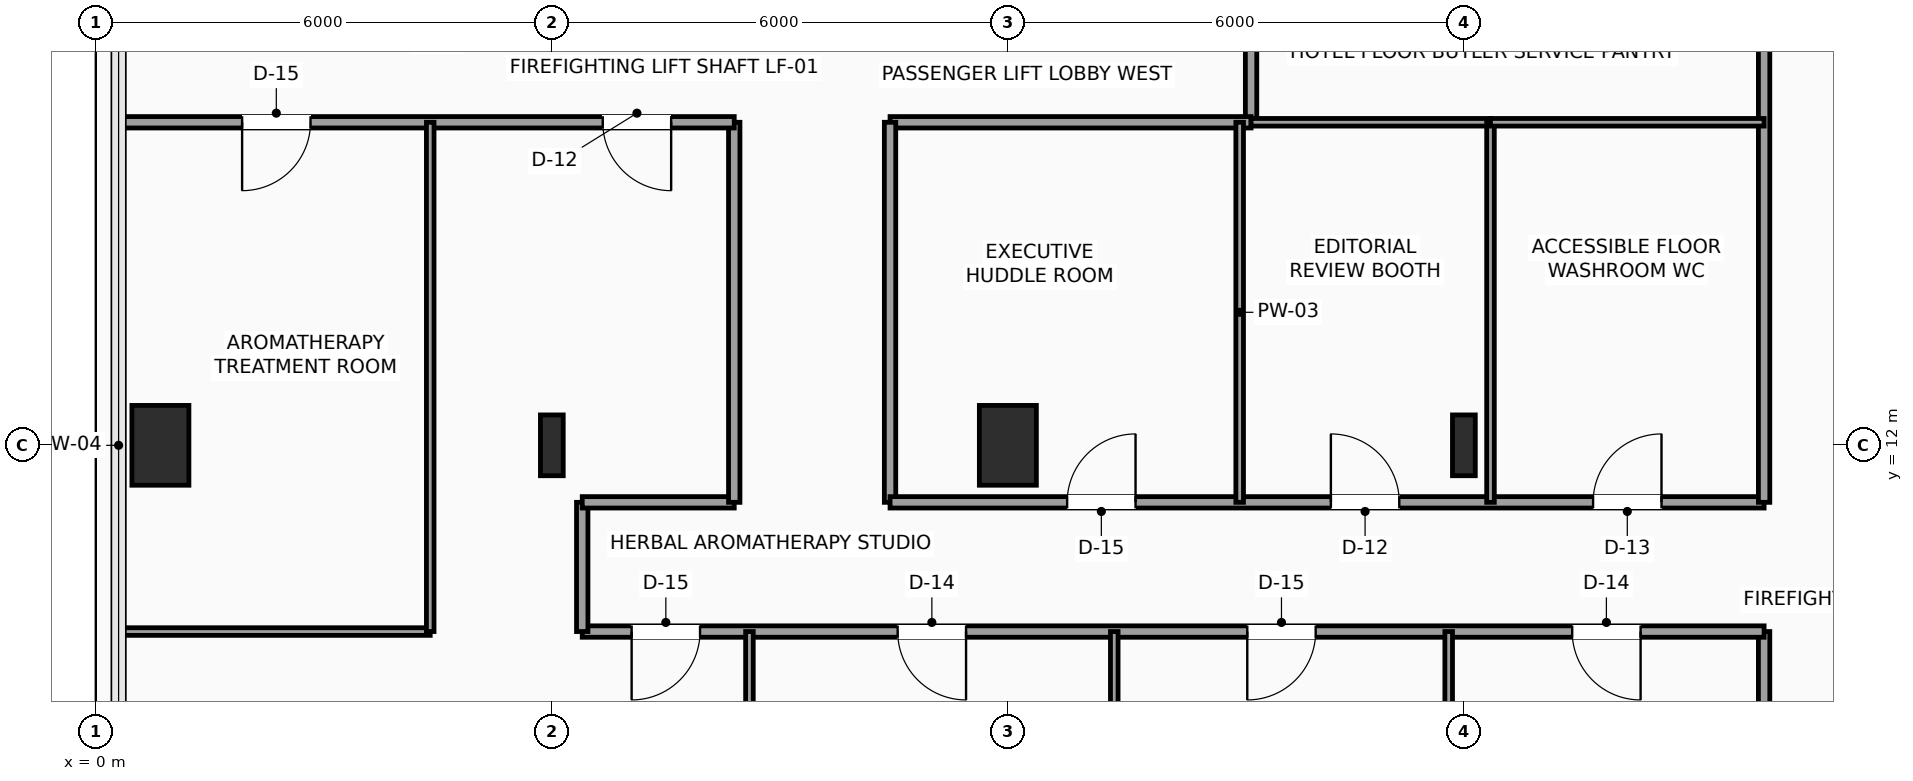
"""IFC4 building model, lengths in metres.
Left out: names, types, materials, properties, quantities, classifications, styles, units other than length and angle.
Written with IfcOpenShell. Run it as: python <this file> out.ifc"""

import sys

from ifc_helpers import new_model, si_unit, direction, frame, frame_2d, origin, origin_2d, place, context, subcontext, project, spatial, rectangle, i_section, extrude, element, fill, save


model = new_model("IFC4")
c1 = context("Model", 3, precision=1e-05, world=origin(), true_north=direction((0.0, 1.0)))
c2 = subcontext(c1, "Body", "Model", "MODEL_VIEW")
j1 = project(units=[si_unit("LENGTHUNIT", "METRE"), si_unit("PLANEANGLEUNIT", "RADIAN")], contexts=[c1])
p1 = place(None, origin())
s1 = spatial("IfcSite", under=j1, at=p1, CompositionType="ELEMENT")
p2 = place(p1, origin())
s2 = spatial("IfcBuilding", under=s1, at=p2, CompositionType="ELEMENT")
p3 = place(p2, frame((0.0, 0.0, 195.45)))
s3 = spatial("IfcBuildingStorey", under=s2, at=p3, CompositionType="ELEMENT", Elevation=195.45)
p4 = place(p3, frame((0.85, 12.0, 0.0), z_axis=(0.0, 0.0, 1.0), x_axis=(1.0, 0.0, 0.0)))
e1 = element("IfcColumn", 1, at=p4, inside=s3, PredefinedType="COLUMN", context=c2, shape_type="SweptSolid", body=[
    extrude(rectangle(XDim=0.75, YDim=1.05, at=origin_2d()), origin(), (0.0, 0.0, 1.0), 3.75),
])
p5 = place(p3, frame((6.0, 12.0, 0.0), z_axis=(0.0, 0.0, 1.0), x_axis=(1.0, 0.0, 0.0)))
e2 = element("IfcColumn", 2, at=p5, inside=s3, PredefinedType="COLUMN", context=c2, shape_type="SweptSolid", body=[
    extrude(i_section(OverallWidth=0.3, OverallDepth=0.8, WebThickness=0.018, FlangeThickness=0.033, FilletRadius=0.03, at=origin_2d()), origin(), (0.0, 0.0, 1.0), 3.75),
])
p6 = place(p3, frame((12.0, 12.0, 0.0), z_axis=(0.0, 0.0, 1.0), x_axis=(1.0, 0.0, 0.0)))
e3 = element("IfcColumn", 3, at=p6, inside=s3, PredefinedType="COLUMN", context=c2, shape_type="SweptSolid", body=[
    extrude(rectangle(XDim=0.75, YDim=1.05, at=origin_2d()), origin(), (0.0, 0.0, 1.0), 3.75),
])
p7 = place(p3, frame((18.0, 12.0, 0.0), z_axis=(0.0, 0.0, 1.0), x_axis=(1.0, 0.0, 0.0)))
e4 = element("IfcColumn", 4, at=p7, inside=s3, PredefinedType="COLUMN", context=c2, shape_type="SweptSolid", body=[
    extrude(i_section(OverallWidth=0.3, OverallDepth=0.8, WebThickness=0.018, FlangeThickness=0.033, FilletRadius=0.03, at=origin_2d()), origin(), (0.0, 0.0, 1.0), 3.75),
])
p8 = place(p3, frame((21.95, 5.8, 0.0), z_axis=(0.0, 0.0, 1.0), x_axis=(0.0, 1.0, 0.0)))
e5 = element("IfcWall", 5, at=p8, inside=s3, PredefinedType="PARTITIONING", context=c2, shape_type="SweptSolid", body=[
    extrude(rectangle(XDim=3.75, YDim=0.15, at=frame_2d((1.875, 0.0))), origin(), (0.0, 0.0, 1.0), 3.475),
])
p9 = place(p3, frame((21.95, 9.55, 0.0), z_axis=(0.0, 0.0, 1.0), x_axis=(-1.0, 0.0, 0.0)))
e6 = element("IfcWall", 6, at=p9, inside=s3, PredefinedType="PARTITIONING", context=c2, shape_type="SweptSolid", body=[
    extrude(rectangle(XDim=15.55, YDim=0.15, at=frame_2d((7.775, 0.0))), origin(), (0.0, 0.0, 1.0), 3.475),
])
p10 = place(p9, frame((14.0, 0.0, 0.0)))
e7 = element("IfcOpeningElement", 7, at=p10, cuts=e6, PredefinedType="OPENING", context=c2, shape_type="SweptSolid", body=[
    extrude(rectangle(XDim=0.9, YDim=2.1, at=frame_2d((0.45, 1.05))), frame((0.0, 0.085, 0.0), z_axis=(0.0, -1.0, 0.0), x_axis=(1.0, 0.0, 0.0)), (0.0, 0.0, 1.0), 0.17),
])
p11 = place(p9, frame((10.5, 0.0, 0.0)))
e8 = element("IfcOpeningElement", 8, at=p11, cuts=e6, PredefinedType="OPENING", context=c2, shape_type="SweptSolid", body=[
    extrude(rectangle(XDim=0.9, YDim=2.1, at=frame_2d((0.45, 1.05))), frame((0.0, 0.085, 0.0), z_axis=(0.0, -1.0, 0.0), x_axis=(1.0, 0.0, 0.0)), (0.0, 0.0, 1.0), 0.17),
])
p12 = place(p9, frame((5.9, 0.0, 0.0)))
e9 = element("IfcOpeningElement", 9, at=p12, cuts=e6, PredefinedType="OPENING", context=c2, shape_type="SweptSolid", body=[
    extrude(rectangle(XDim=0.9, YDim=2.1, at=frame_2d((0.45, 1.05))), frame((0.0, 0.085, 0.0), z_axis=(0.0, -1.0, 0.0), x_axis=(1.0, 0.0, 0.0)), (0.0, 0.0, 1.0), 0.17),
])
p13 = place(p9, frame((1.625, 0.0, 0.0)))
e10 = element("IfcOpeningElement", 10, at=p13, cuts=e6, PredefinedType="OPENING", context=c2, shape_type="SweptSolid", body=[
    extrude(rectangle(XDim=0.9, YDim=2.1, at=frame_2d((0.45, 1.05))), frame((0.0, 0.085, 0.0), z_axis=(0.0, -1.0, 0.0), x_axis=(1.0, 0.0, 0.0)), (0.0, 0.0, 1.0), 0.17),
])
p14 = place(p3, frame((6.4, 9.55, 0.0), z_axis=(0.0, 0.0, 1.0), x_axis=(0.0, 1.0, 0.0)))
e11 = element("IfcWall", 11, at=p14, inside=s3, PredefinedType="PARTITIONING", context=c2, shape_type="SweptSolid", body=[
    extrude(rectangle(XDim=1.7, YDim=0.15, at=frame_2d((0.85, 0.0))), origin(), (0.0, 0.0, 1.0), 3.475),
])
p15 = place(p3, frame((6.4, 11.25, 0.0), z_axis=(0.0, 0.0, 1.0), x_axis=(1.0, 0.0, 0.0)))
e12 = element("IfcWall", 12, at=p15, inside=s3, PredefinedType="PARTITIONING", context=c2, shape_type="SweptSolid", body=[
    extrude(rectangle(XDim=2.0, YDim=0.15, at=frame_2d((1.0, 0.0))), origin(), (0.0, 0.0, 1.0), 3.475),
])
p16 = place(p3, frame((8.4, 11.25, 0.0), z_axis=(0.0, 0.0, 1.0), x_axis=(0.0, 1.0, 0.0)))
e13 = element("IfcWall", 13, at=p16, inside=s3, PredefinedType="PARTITIONING", context=c2, shape_type="SweptSolid", body=[
    extrude(rectangle(XDim=5.0, YDim=0.15, at=frame_2d((2.5, 0.0))), origin(), (0.0, 0.0, 1.0), 3.475),
])
p17 = place(p3, frame((8.4, 16.25, 0.0), z_axis=(0.0, 0.0, 1.0), x_axis=(-1.0, 0.0, 0.0)))
e14 = element("IfcWall", 14, at=p17, inside=s3, PredefinedType="PARTITIONING", context=c2, shape_type="SweptSolid", body=[
    extrude(rectangle(XDim=8.1, YDim=0.15, at=frame_2d((4.05, 0.0))), origin(), (0.0, 0.0, 1.0), 3.475),
])
p18 = place(p17, frame((5.575, 0.0, 0.0)))
e15 = element("IfcOpeningElement", 15, at=p18, cuts=e14, PredefinedType="OPENING", context=c2, shape_type="SweptSolid", body=[
    extrude(rectangle(XDim=0.9, YDim=2.1, at=frame_2d((0.45, 1.05))), frame((0.0, 0.085, 0.0), z_axis=(0.0, -1.0, 0.0), x_axis=(1.0, 0.0, 0.0)), (0.0, 0.0, 1.0), 0.17),
])
p19 = place(p17, frame((0.83, 0.0, 0.0)))
e16 = element("IfcOpeningElement", 16, at=p19, cuts=e14, PredefinedType="OPENING", context=c2, shape_type="SweptSolid", body=[
    extrude(rectangle(XDim=0.9, YDim=2.1, at=frame_2d((0.45, 1.05))), frame((0.0, 0.085, 0.0), z_axis=(0.0, -1.0, 0.0), x_axis=(1.0, 0.0, 0.0)), (0.0, 0.0, 1.0), 0.17),
])
p20 = place(p3, frame((15.2, 17.95, 0.0), z_axis=(0.0, 0.0, 1.0), x_axis=(0.0, -1.0, 0.0)))
e17 = element("IfcWall", 17, at=p20, inside=s3, PredefinedType="PARTITIONING", context=c2, shape_type="SweptSolid", body=[
    extrude(rectangle(XDim=1.7, YDim=0.15, at=frame_2d((0.85, 0.0))), origin(), (0.0, 0.0, 1.0), 3.475),
])
p21 = place(p3, frame((15.2, 16.25, 0.0), z_axis=(0.0, 0.0, 1.0), x_axis=(-1.0, 0.0, 0.0)))
e18 = element("IfcWall", 18, at=p21, inside=s3, PredefinedType="PARTITIONING", context=c2, shape_type="SweptSolid", body=[
    extrude(rectangle(XDim=4.75, YDim=0.15, at=frame_2d((2.375, 0.0))), origin(), (0.0, 0.0, 1.0), 3.475),
])
p22 = place(p3, frame((10.45, 16.25, 0.0), z_axis=(0.0, 0.0, 1.0), x_axis=(0.0, -1.0, 0.0)))
e19 = element("IfcWall", 19, at=p22, inside=s3, PredefinedType="PARTITIONING", context=c2, shape_type="SweptSolid", body=[
    extrude(rectangle(XDim=5.0, YDim=0.15, at=frame_2d((2.5, 0.0))), origin(), (0.0, 0.0, 1.0), 3.475),
])
p23 = place(p3, frame((10.45, 11.25, 0.0), z_axis=(0.0, 0.0, 1.0), x_axis=(1.0, 0.0, 0.0)))
e20 = element("IfcWall", 20, at=p23, inside=s3, PredefinedType="PARTITIONING", context=c2, shape_type="SweptSolid", body=[
    extrude(rectangle(XDim=11.5, YDim=0.15, at=frame_2d((5.75, 0.0))), origin(), (0.0, 0.0, 1.0), 3.475),
])
p24 = place(p23, frame((2.33, 0.0, 0.0)))
e21 = element("IfcOpeningElement", 21, at=p24, cuts=e20, PredefinedType="OPENING", context=c2, shape_type="SweptSolid", body=[
    extrude(rectangle(XDim=0.9, YDim=2.1, at=frame_2d((0.45, 1.05))), frame((0.0, 0.085, 0.0), z_axis=(0.0, -1.0, 0.0), x_axis=(1.0, 0.0, 0.0)), (0.0, 0.0, 1.0), 0.17),
])
p25 = place(p23, frame((5.8, 0.0, 0.0)))
e22 = element("IfcOpeningElement", 22, at=p25, cuts=e20, PredefinedType="OPENING", context=c2, shape_type="SweptSolid", body=[
    extrude(rectangle(XDim=0.9, YDim=2.1, at=frame_2d((0.45, 1.05))), frame((0.0, 0.085, 0.0), z_axis=(0.0, -1.0, 0.0), x_axis=(1.0, 0.0, 0.0)), (0.0, 0.0, 1.0), 0.17),
])
p26 = place(p23, frame((9.25, 0.0, 0.0)))
e23 = element("IfcOpeningElement", 23, at=p26, cuts=e20, PredefinedType="OPENING", context=c2, shape_type="SweptSolid", body=[
    extrude(rectangle(XDim=0.9, YDim=2.1, at=frame_2d((0.45, 1.05))), frame((0.0, 0.085, 0.0), z_axis=(0.0, -1.0, 0.0), x_axis=(1.0, 0.0, 0.0)), (0.0, 0.0, 1.0), 0.17),
])
p27 = place(p3, frame((21.95, 11.25, 0.0), z_axis=(0.0, 0.0, 1.0), x_axis=(0.0, 1.0, 0.0)))
e24 = element("IfcWall", 24, at=p27, inside=s3, PredefinedType="PARTITIONING", context=c2, shape_type="SweptSolid", body=[
    extrude(rectangle(XDim=19.0, YDim=0.15, at=frame_2d((9.5, 0.0))), origin(), (0.0, 0.0, 1.0), 3.475),
])
p28 = place(p3, frame((15.05, 11.25, 0.0), z_axis=(0.0, 0.0, 1.0), x_axis=(0.0, 1.0, 0.0)))
e25 = element("IfcWall", 25, at=p28, inside=s3, PredefinedType="PARTITIONING", context=c2, shape_type="SweptSolid", body=[
    extrude(rectangle(XDim=5.0, YDim=0.1, at=frame_2d((2.5, 0.0))), origin(), (0.0, 0.0, 1.0), 3.475),
])
p29 = place(p3, frame((15.2, 16.25, 0.0), z_axis=(0.0, 0.0, 1.0), x_axis=(1.0, 0.0, 0.0)))
e26 = element("IfcWall", 26, at=p29, inside=s3, PredefinedType="PARTITIONING", context=c2, shape_type="SweptSolid", body=[
    extrude(rectangle(XDim=3.15, YDim=0.1, at=frame_2d((1.575, 0.0))), origin(), (0.0, 0.0, 1.0), 3.475),
])
p30 = place(p3, frame((18.35, 11.25, 0.0), z_axis=(0.0, 0.0, 1.0), x_axis=(0.0, 1.0, 0.0)))
e27 = element("IfcWall", 27, at=p30, inside=s3, PredefinedType="PARTITIONING", context=c2, shape_type="SweptSolid", body=[
    extrude(rectangle(XDim=5.0, YDim=0.1, at=frame_2d((2.5, 0.0))), origin(), (0.0, 0.0, 1.0), 3.475),
])
p31 = place(p3, frame((18.35, 16.25, 0.0), z_axis=(0.0, 0.0, 1.0), x_axis=(1.0, 0.0, 0.0)))
e28 = element("IfcWall", 28, at=p31, inside=s3, PredefinedType="PARTITIONING", context=c2, shape_type="SweptSolid", body=[
    extrude(rectangle(XDim=3.6, YDim=0.1, at=frame_2d((1.8, 0.0))), origin(), (0.0, 0.0, 1.0), 3.475),
])
p32 = place(p3, frame((0.35, 0.35, 0.0), z_axis=(0.0, 0.0, 1.0), x_axis=(-0.005440038388, 0.999985202882, 0.0)))
e29 = element("IfcWall", 29, at=p32, inside=s3, PredefinedType="PARTITIONING", context=c2, shape_type="SweptSolid", body=[
    extrude(rectangle(XDim=9.2, YDim=0.1, at=frame_2d((4.6, 0.0))), origin(), (0.0, 0.0, 1.0), 3.475),
])
for number, where, z_axis, x_axis in (
    (30, (8.6, 0.3, 0.0), (0.0, 0.0, 1.0), (0.0, 1.0, 0.0)),
    (31, (13.4, 0.3, 0.0), (0.0, 0.0, 1.0), (0.0, 1.0, 0.0)),
):
    element("IfcWall", number, at=place(p3, frame(where, z_axis=z_axis, x_axis=x_axis)), inside=s3, PredefinedType="PARTITIONING", context=c2, shape_type="SweptSolid", body=[
        extrude(rectangle(XDim=9.25, YDim=0.1, at=frame_2d((4.625, 0.0))), origin(), (0.0, 0.0, 1.0), 3.475),
    ])
p33 = place(p3, frame((17.8, 0.3, 0.0), z_axis=(0.0, 0.0, 1.0), x_axis=(0.0, 1.0, 0.0)))
e32 = element("IfcWall", 32, at=p33, inside=s3, PredefinedType="PARTITIONING", context=c2, shape_type="SweptSolid", body=[
    extrude(rectangle(XDim=9.25, YDim=0.1, at=frame_2d((4.625, 0.0))), origin(), (0.0, 0.0, 1.0), 3.067),
])
p34 = place(p3, frame((0.3, 9.55, 0.0), z_axis=(0.0, 0.0, 1.0), x_axis=(1.0, 0.0, 0.0)))
e33 = element("IfcWall", 33, at=p34, inside=s3, PredefinedType="PARTITIONING", context=c2, shape_type="SweptSolid", body=[
    extrude(rectangle(XDim=4.1, YDim=0.1, at=frame_2d((2.05, 0.0))), origin(), (0.0, 0.0, 1.0), 3.475),
])
p35 = place(p3, frame((4.4, 9.55, 0.0), z_axis=(0.0, 0.0, 1.0), x_axis=(0.0, 1.0, 0.0)))
e34 = element("IfcWall", 34, at=p35, inside=s3, PredefinedType="PARTITIONING", context=c2, shape_type="SweptSolid", body=[
    extrude(rectangle(XDim=6.7, YDim=0.1, at=frame_2d((3.35, 0.0))), origin(), (0.0, 0.0, 1.0), 3.475),
])
p36 = place(p10, origin())
e35 = element("IfcDoor", 35, at=p36, inside=s3, OperationType="SINGLE_SWING_RIGHT", PredefinedType="DOOR", context=c2, shape_type="SweptSolid", body=[
    extrude(rectangle(XDim=0.9, YDim=2.1, at=frame_2d((0.45, 1.05))), frame((0.0, 0.025, 0.0), z_axis=(0.0, -1.0, 0.0), x_axis=(1.0, 0.0, 0.0)), (0.0, 0.0, 1.0), 0.05),
])
fill(e7, e35)
p37 = place(p11, origin())
e36 = element("IfcDoor", 36, at=p37, inside=s3, OperationType="SINGLE_SWING_LEFT", PredefinedType="DOOR", context=c2, shape_type="SweptSolid", body=[
    extrude(rectangle(XDim=0.9, YDim=2.1, at=frame_2d((0.45, 1.05))), frame((0.0, 0.025, 0.0), z_axis=(0.0, -1.0, 0.0), x_axis=(1.0, 0.0, 0.0)), (0.0, 0.0, 1.0), 0.05),
])
fill(e8, e36)
p38 = place(p12, origin())
e37 = element("IfcDoor", 37, at=p38, inside=s3, OperationType="SINGLE_SWING_RIGHT", PredefinedType="DOOR", context=c2, shape_type="SweptSolid", body=[
    extrude(rectangle(XDim=0.9, YDim=2.1, at=frame_2d((0.45, 1.05))), frame((0.0, 0.025, 0.0), z_axis=(0.0, -1.0, 0.0), x_axis=(1.0, 0.0, 0.0)), (0.0, 0.0, 1.0), 0.05),
])
fill(e9, e37)
p39 = place(p13, origin())
e38 = element("IfcDoor", 38, at=p39, inside=s3, OperationType="SINGLE_SWING_LEFT", PredefinedType="DOOR", context=c2, shape_type="SweptSolid", body=[
    extrude(rectangle(XDim=0.9, YDim=2.1, at=frame_2d((0.45, 1.05))), frame((0.0, 0.025, 0.0), z_axis=(0.0, -1.0, 0.0), x_axis=(1.0, 0.0, 0.0)), (0.0, 0.0, 1.0), 0.05),
])
fill(e10, e38)
p40 = place(p18, origin())
e39 = element("IfcDoor", 39, at=p40, inside=s3, OperationType="SINGLE_SWING_RIGHT", PredefinedType="DOOR", context=c2, shape_type="SweptSolid", body=[
    extrude(rectangle(XDim=0.9, YDim=2.1, at=frame_2d((0.45, 1.05))), frame((0.0, 0.025, 0.0), z_axis=(0.0, -1.0, 0.0), x_axis=(1.0, 0.0, 0.0)), (0.0, 0.0, 1.0), 0.05),
])
fill(e15, e39)
p41 = place(p19, origin())
e40 = element("IfcDoor", 40, at=p41, inside=s3, OperationType="SINGLE_SWING_LEFT", PredefinedType="DOOR", context=c2, shape_type="SweptSolid", body=[
    extrude(rectangle(XDim=0.9, YDim=2.1, at=frame_2d((0.45, 1.05))), frame((0.0, 0.025, 0.0), z_axis=(0.0, -1.0, 0.0), x_axis=(1.0, 0.0, 0.0)), (0.0, 0.0, 1.0), 0.05),
])
fill(e16, e40)
p42 = place(p24, origin())
e41 = element("IfcDoor", 41, at=p42, inside=s3, OperationType="SINGLE_SWING_RIGHT", PredefinedType="DOOR", context=c2, shape_type="SweptSolid", body=[
    extrude(rectangle(XDim=0.9, YDim=2.1, at=frame_2d((0.45, 1.05))), frame((0.0, 0.025, 0.0), z_axis=(0.0, -1.0, 0.0), x_axis=(1.0, 0.0, 0.0)), (0.0, 0.0, 1.0), 0.05),
])
fill(e21, e41)
p43 = place(p25, origin())
e42 = element("IfcDoor", 42, at=p43, inside=s3, OperationType="SINGLE_SWING_LEFT", PredefinedType="DOOR", context=c2, shape_type="SweptSolid", body=[
    extrude(rectangle(XDim=0.9, YDim=2.1, at=frame_2d((0.45, 1.05))), frame((0.0, 0.025, 0.0), z_axis=(0.0, -1.0, 0.0), x_axis=(1.0, 0.0, 0.0)), (0.0, 0.0, 1.0), 0.05),
])
fill(e22, e42)
p44 = place(p26, origin())
e43 = element("IfcDoor", 43, at=p44, inside=s3, OperationType="SINGLE_SWING_RIGHT", PredefinedType="DOOR", context=c2, shape_type="SweptSolid", body=[
    extrude(rectangle(XDim=0.9, YDim=2.1, at=frame_2d((0.45, 1.05))), frame((0.0, 0.025, 0.0), z_axis=(0.0, -1.0, 0.0), x_axis=(1.0, 0.0, 0.0)), (0.0, 0.0, 1.0), 0.05),
])
fill(e23, e43)
save(model, sys.argv[1])
